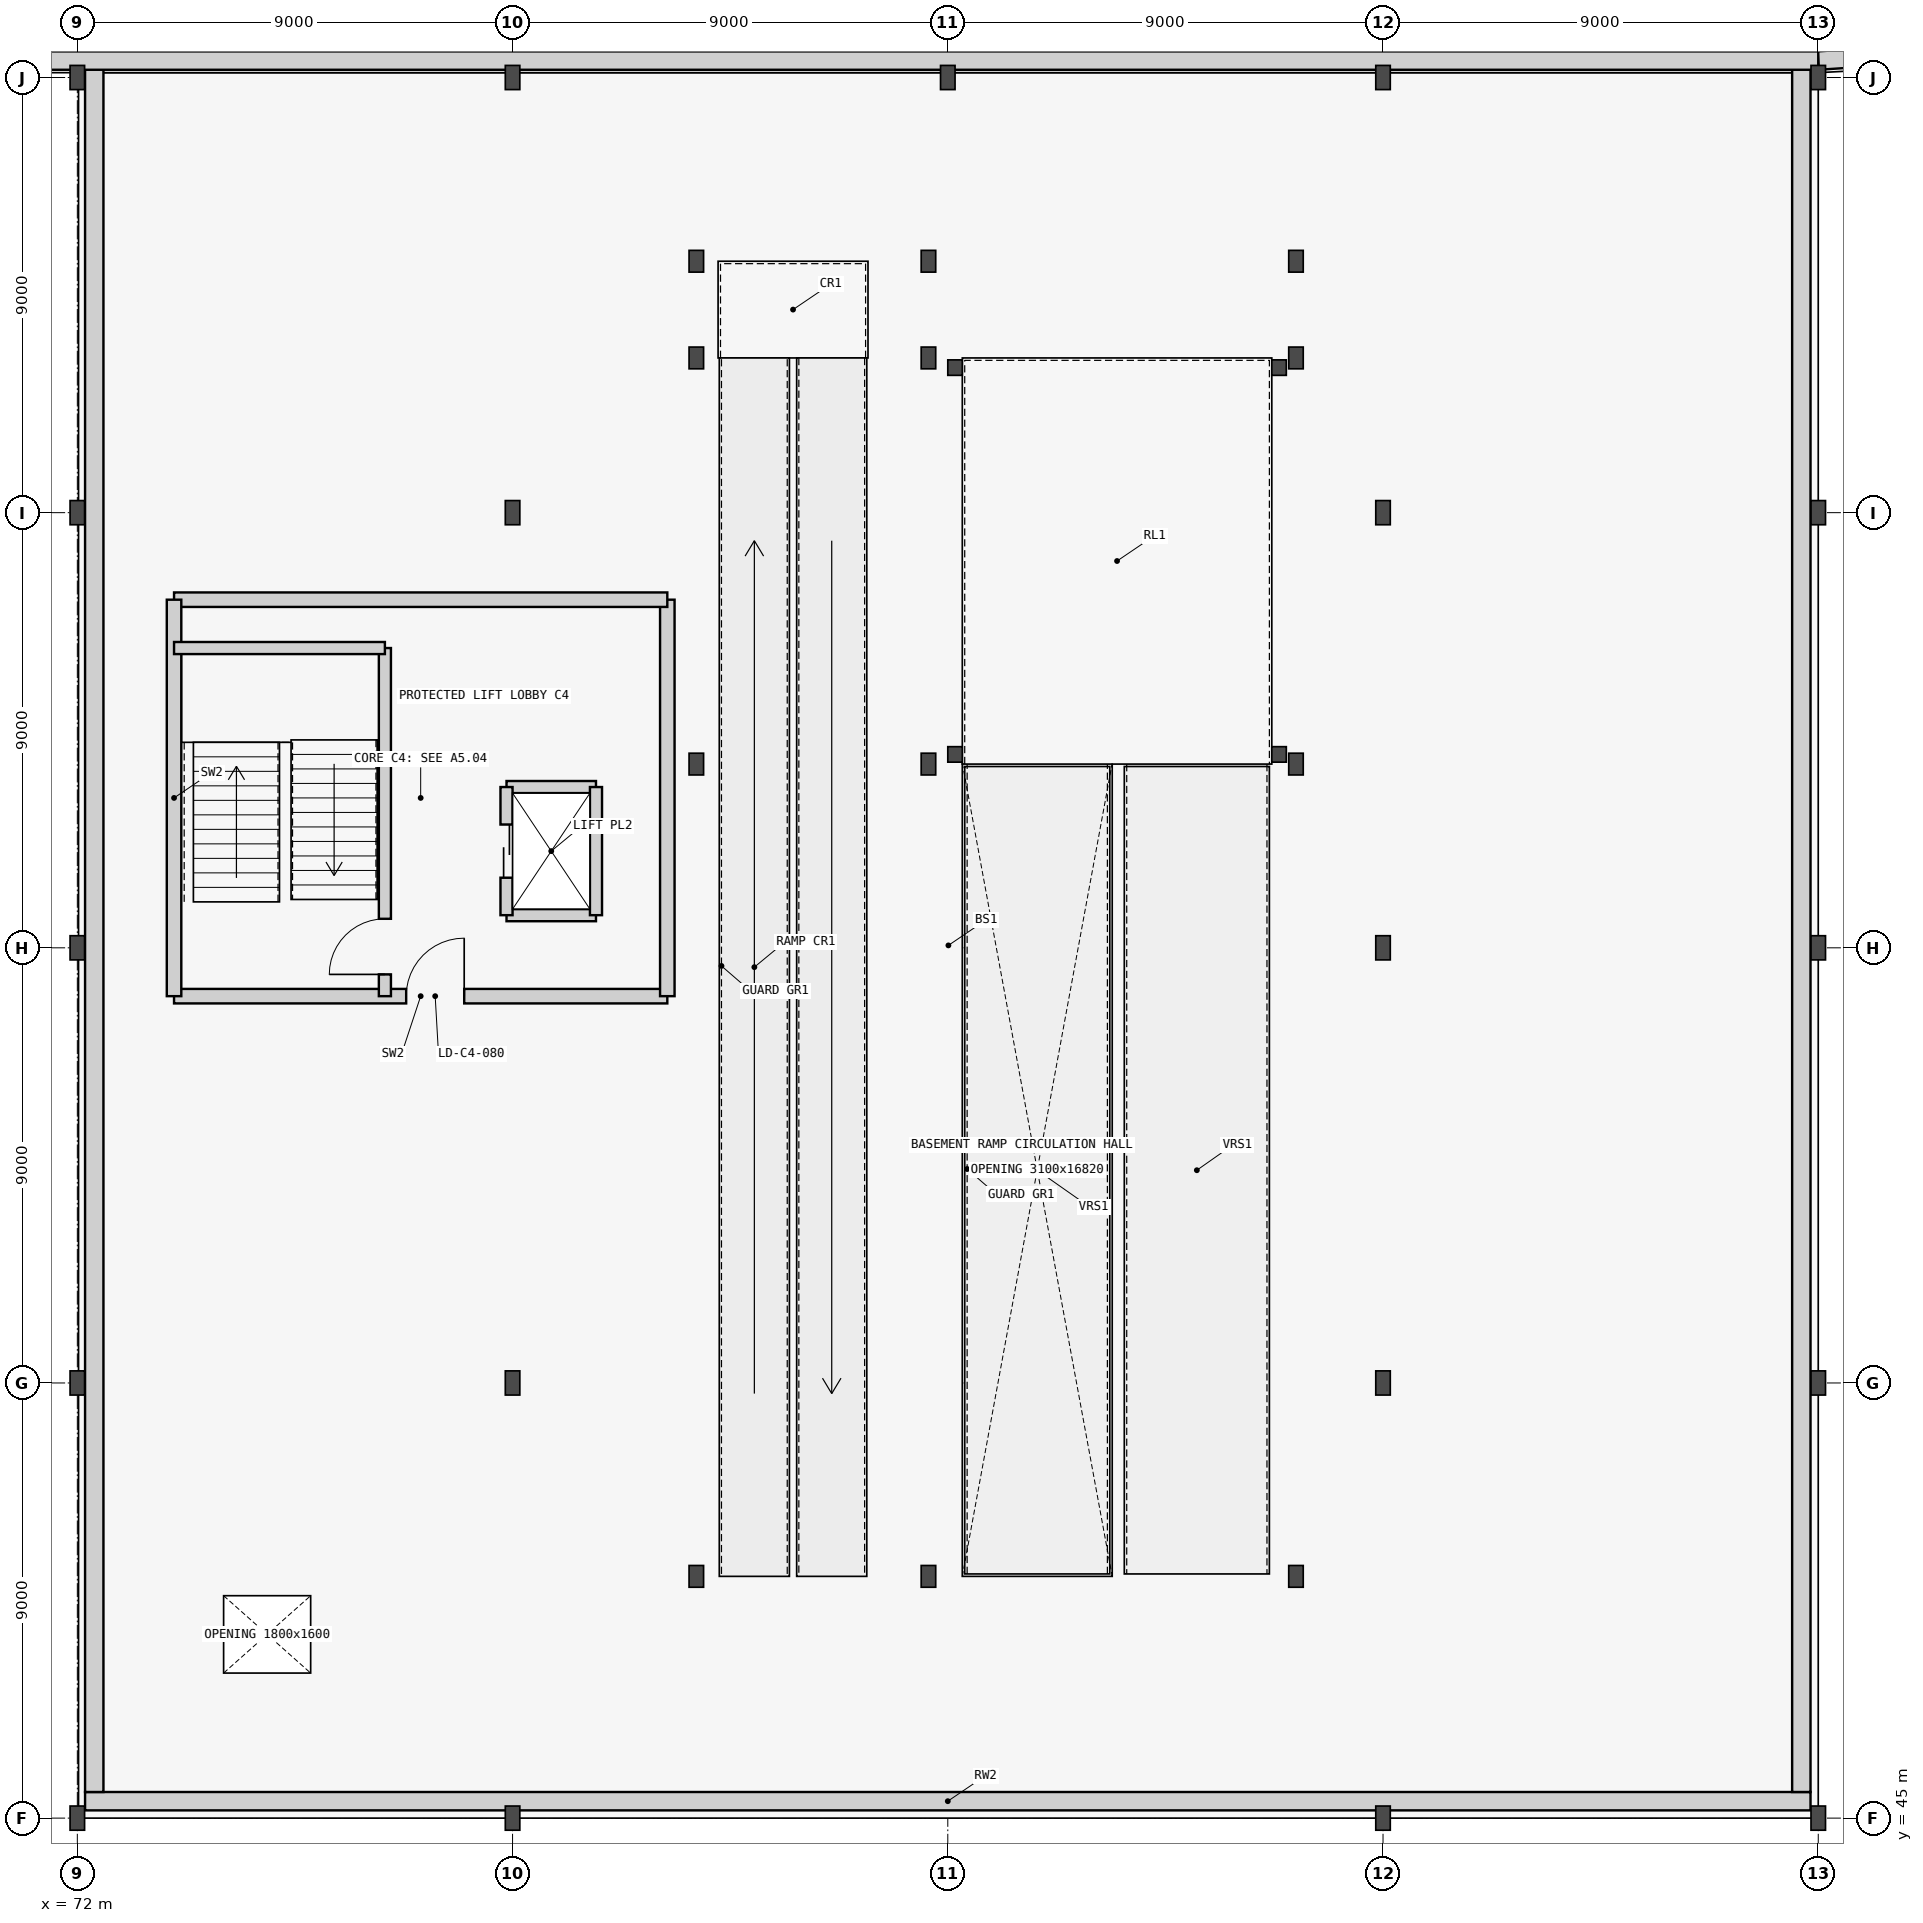
"""IFC4 building model, lengths in metres.
Left out: names, types, materials, properties, quantities, classifications, styles, units other than length and angle.
Written with IfcOpenShell. Run it as: python <this file> out.ifc"""

import sys

from ifc_helpers import new_model, si_unit, direction, frame, frame_2d, origin, origin_2d, place, context, subcontext, project, spatial, rectangle, i_section, extrude, element, fill, save


model = new_model("IFC4")
c1 = context("Model", 3, precision=1e-05, world=origin(), true_north=direction((0.0, 1.0)))
c2 = subcontext(c1, "Body", "Model", "MODEL_VIEW")
j1 = project(units=[si_unit("LENGTHUNIT", "METRE"), si_unit("PLANEANGLEUNIT", "RADIAN")], contexts=[c1])
p1 = place(None, origin())
s1 = spatial("IfcSite", under=j1, at=p1, CompositionType="ELEMENT")
p2 = place(p1, origin())
s2 = spatial("IfcBuilding", under=s1, at=p2, CompositionType="ELEMENT")
p3 = place(p2, frame((0.0, 0.0, -4.2)))
s3 = spatial("IfcBuildingStorey", under=s2, at=p3, CompositionType="ELEMENT", Elevation=-4.2)
for number, where, z_axis, x_axis in (
    (1, (72.0, 45.0, 0.0), (0.0, 0.0, 1.0), (1.0, 0.0, 0.0)),
    (2, (72.0, 54.0, 0.0), (0.0, 0.0, 1.0), (1.0, 0.0, 0.0)),
    (3, (72.0, 63.0, 0.0), (0.0, 0.0, 1.0), (1.0, 0.0, 0.0)),
    (4, (72.0, 72.0, 0.0), (0.0, 0.0, 1.0), (1.0, 0.0, 0.0)),
    (5, (72.0, 81.0, 0.0), (0.0, 0.0, 1.0), (1.0, 0.0, 0.0)),
    (6, (81.0, 45.0, 0.0), (0.0, 0.0, 1.0), (1.0, 0.0, 0.0)),
    (7, (81.0, 54.0, 0.0), (0.0, 0.0, 1.0), (1.0, 0.0, 0.0)),
    (8, (81.0, 72.0, 0.0), (0.0, 0.0, 1.0), (1.0, 0.0, 0.0)),
    (9, (81.0, 81.0, 0.0), (0.0, 0.0, 1.0), (1.0, 0.0, 0.0)),
    (10, (99.0, 45.0, 0.0), (0.0, 0.0, 1.0), (1.0, 0.0, 0.0)),
    (11, (99.0, 54.0, 0.0), (0.0, 0.0, 1.0), (1.0, 0.0, 0.0)),
    (12, (99.0, 63.0, 0.0), (0.0, 0.0, 1.0), (1.0, 0.0, 0.0)),
    (13, (99.0, 72.0, 0.0), (0.0, 0.0, 1.0), (1.0, 0.0, 0.0)),
    (14, (99.0, 81.0, 0.0), (0.0, 0.0, 1.0), (1.0, 0.0, 0.0)),
    (15, (108.0, 45.0, 0.0), (0.0, 0.0, 1.0), (1.0, 0.0, 0.0)),
    (16, (108.0, 54.0, 0.0), (0.0, 0.0, 1.0), (1.0, 0.0, 0.0)),
    (17, (108.0, 63.0, 0.0), (0.0, 0.0, 1.0), (1.0, 0.0, 0.0)),
    (18, (108.0, 72.0, 0.0), (0.0, 0.0, 1.0), (1.0, 0.0, 0.0)),
    (19, (108.0, 81.0, 0.0), (0.0, 0.0, 1.0), (1.0, 0.0, 0.0)),
):
    element("IfcColumn", number, at=place(p3, frame(where, z_axis=z_axis, x_axis=x_axis)), inside=s3, PredefinedType="COLUMN", context=c2, shape_type="SweptSolid", body=[
        extrude(i_section(OverallWidth=0.3, OverallDepth=0.5, WebThickness=0.014, FlangeThickness=0.028, FilletRadius=0.027, at=origin_2d()), origin(), (0.0, 0.0, 1.0), 4.2),
    ])
for number, where, z_axis, x_axis in (
    (20, (84.8, 50.0, 0.0), (0.0, 0.0, 1.0), (1.0, 0.0, 0.0)),
    (21, (84.8, 66.8, 0.0), (0.0, 0.0, 1.0), (1.0, 0.0, 0.0)),
    (22, (84.8, 75.2, 0.0), (0.0, 0.0, 1.0), (1.0, 0.0, 0.0)),
    (23, (84.8, 77.2, 0.0), (0.0, 0.0, 1.0), (1.0, 0.0, 0.0)),
    (24, (89.6, 50.0, 0.0), (0.0, 0.0, 1.0), (1.0, 0.0, 0.0)),
    (25, (89.6, 66.8, 0.0), (0.0, 0.0, 1.0), (1.0, 0.0, 0.0)),
    (26, (89.6, 75.2, 0.0), (0.0, 0.0, 1.0), (1.0, 0.0, 0.0)),
    (27, (89.6, 77.2, 0.0), (0.0, 0.0, 1.0), (1.0, 0.0, 0.0)),
    (28, (97.2, 50.0, 0.0), (0.0, 0.0, 1.0), (1.0, 0.0, 0.0)),
    (29, (97.2, 66.8, 0.0), (0.0, 0.0, 1.0), (1.0, 0.0, 0.0)),
    (30, (97.2, 75.2, 0.0), (0.0, 0.0, 1.0), (1.0, 0.0, 0.0)),
    (31, (97.2, 77.2, 0.0), (0.0, 0.0, 1.0), (1.0, 0.0, 0.0)),
):
    element("IfcColumn", number, at=place(p3, frame(where, z_axis=z_axis, x_axis=x_axis)), inside=s3, PredefinedType="COLUMN", context=c2, shape_type="SweptSolid", body=[
        extrude(i_section(OverallWidth=0.3, OverallDepth=0.45, WebThickness=0.014, FlangeThickness=0.026, FilletRadius=0.027, at=origin_2d()), origin(), (0.0, 0.0, 1.0), 4.2),
    ])
p4 = place(p3, frame((90.0, 81.0, 0.0), z_axis=(0.0, 0.0, 1.0), x_axis=(1.0, 0.0, 0.0)))
e32 = element("IfcColumn", 32, at=p4, inside=s3, PredefinedType="COLUMN", context=c2, shape_type="SweptSolid", body=[
    extrude(i_section(OverallWidth=0.3, OverallDepth=0.5, WebThickness=0.014, FlangeThickness=0.028, FilletRadius=0.027, at=origin_2d()), origin(), (0.0, 0.0, 1.0), 4.2),
])
for number, where, z_axis, x_axis in (
    (33, (90.15, 67.0, 0.0), (0.0, 0.0, 1.0), (1.0, 0.0, 0.0)),
    (34, (90.15, 75.0, 0.0), (0.0, 0.0, 1.0), (1.0, 0.0, 0.0)),
    (35, (96.85, 67.0, 0.0), (0.0, 0.0, 1.0), (1.0, 0.0, 0.0)),
    (36, (96.85, 75.0, 0.0), (0.0, 0.0, 1.0), (1.0, 0.0, 0.0)),
):
    element("IfcColumn", number, at=place(p3, frame(where, z_axis=z_axis, x_axis=x_axis)), inside=s3, PredefinedType="COLUMN", context=c2, shape_type="SweptSolid", body=[
        extrude(i_section(OverallWidth=0.3, OverallDepth=0.32, WebThickness=0.011, FlangeThickness=0.021, FilletRadius=0.027, at=origin_2d()), origin(), (0.0, 0.0, 1.0), 4.2),
    ])
p5 = place(p3, frame((72.16, 45.35, 0.0), z_axis=(0.0, 0.0, 1.0), x_axis=(1.0, 0.0, 0.0)))
e37 = element("IfcWall", 37, at=p5, inside=s3, PredefinedType="USERDEFINED", context=c2, shape_type="SweptSolid", body=[
    extrude(rectangle(XDim=35.68, YDim=0.38, at=frame_2d((17.84, 0.0))), origin(), (0.0, 0.0, 1.0), 3.6),
])
for number, where, z_axis, x_axis in (
    (38, (72.35, 45.54, 0.0), (0.0, 0.0, 1.0), (0.0, 1.0, 0.0)),
    (39, (107.65, 45.54, 0.0), (0.0, 0.0, 1.0), (0.0, 1.0, 0.0)),
):
    element("IfcWall", number, at=place(p3, frame(where, z_axis=z_axis, x_axis=x_axis)), inside=s3, PredefinedType="USERDEFINED", context=c2, shape_type="SweptSolid", body=[
        extrude(rectangle(XDim=35.81, YDim=0.38, at=frame_2d((17.905, 0.0))), origin(), (0.0, 0.0, 1.0), 3.6),
    ])
p6 = place(p3, frame((108.0, 81.35, 0.0), z_axis=(0.0, 0.0, 1.0), x_axis=(0.997859834312, 0.065389227447, 0.0)))
e40 = element("IfcWall", 40, at=p6, inside=s3, PredefinedType="USERDEFINED", context=c2, shape_type="SweptSolid", body=[
    extrude(rectangle(XDim=2.897, YDim=0.38, at=frame_2d((1.449, 0.0))), origin(), (0.0, 0.0, 1.0), 3.6),
])
p7 = place(p3, frame((63.0, 81.35, 0.0), z_axis=(0.0, 0.0, 1.0), x_axis=(1.0, 0.0, 0.0)))
e41 = element("IfcWall", 41, at=p7, inside=s3, PredefinedType="USERDEFINED", context=c2, shape_type="SweptSolid", body=[
    extrude(rectangle(XDim=45.0, YDim=0.38, at=frame_2d((22.5, 0.0))), origin(), (0.0, 0.0, 1.0), 3.6),
])
p8 = place(p3, frame((74.0, 62.0, 0.0), z_axis=(0.0, 0.0, 1.0), x_axis=(1.0, 0.0, 0.0)))
e42 = element("IfcWall", 42, at=p8, inside=s3, PredefinedType="SHEAR", context=c2, shape_type="SweptSolid", body=[
    extrude(rectangle(XDim=10.2, YDim=0.3, at=frame_2d((5.1, 0.0))), origin(), (0.0, 0.0, 1.0), 3.94),
])
p9 = place(p8, frame((4.8, 0.0, 0.0)))
e43 = element("IfcOpeningElement", 43, at=p9, cuts=e42, PredefinedType="OPENING", context=c2, shape_type="SweptSolid", body=[
    extrude(rectangle(XDim=1.2, YDim=2.15, at=frame_2d((0.6, 1.075))), frame((0.0, 0.16, 0.0), z_axis=(0.0, -1.0, 0.0), x_axis=(1.0, 0.0, 0.0)), (0.0, 0.0, 1.0), 0.32),
])
p10 = place(p3, frame((84.2, 62.0, 0.0), z_axis=(0.0, 0.0, 1.0), x_axis=(0.0, 1.0, 0.0)))
e44 = element("IfcWall", 44, at=p10, inside=s3, PredefinedType="SHEAR", context=c2, shape_type="SweptSolid", body=[
    extrude(rectangle(XDim=8.2, YDim=0.3, at=frame_2d((4.1, 0.0))), origin(), (0.0, 0.0, 1.0), 3.94),
])
p11 = place(p3, frame((84.2, 70.2, 0.0), z_axis=(0.0, 0.0, 1.0), x_axis=(-1.0, 0.0, 0.0)))
e45 = element("IfcWall", 45, at=p11, inside=s3, PredefinedType="SHEAR", context=c2, shape_type="SweptSolid", body=[
    extrude(rectangle(XDim=10.2, YDim=0.3, at=frame_2d((5.1, 0.0))), origin(), (0.0, 0.0, 1.0), 3.94),
])
p12 = place(p3, frame((74.0, 70.2, 0.0), z_axis=(0.0, 0.0, 1.0), x_axis=(0.0, -1.0, 0.0)))
e46 = element("IfcWall", 46, at=p12, inside=s3, PredefinedType="SHEAR", context=c2, shape_type="SweptSolid", body=[
    extrude(rectangle(XDim=8.2, YDim=0.3, at=frame_2d((4.1, 0.0))), origin(), (0.0, 0.0, 1.0), 3.94),
])
p13 = place(p3, frame((78.36, 62.0, 0.0), z_axis=(0.0, 0.0, 1.0), x_axis=(0.0, 1.0, 0.0)))
e47 = element("IfcWall", 47, at=p13, inside=s3, PredefinedType="SHEAR", context=c2, shape_type="SweptSolid", body=[
    extrude(rectangle(XDim=7.2, YDim=0.25, at=frame_2d((3.6, 0.0))), origin(), (0.0, 0.0, 1.0), 3.94),
])
p14 = place(p13, frame((0.45, 0.0, 0.0)))
e48 = element("IfcOpeningElement", 48, at=p14, cuts=e47, PredefinedType="OPENING", context=c2, shape_type="SweptSolid", body=[
    extrude(rectangle(XDim=1.15, YDim=2.15, at=frame_2d((0.575, 1.075))), frame((0.0, 0.135, 0.0), z_axis=(0.0, -1.0, 0.0), x_axis=(1.0, 0.0, 0.0)), (0.0, 0.0, 1.0), 0.27),
])
p15 = place(p3, frame((74.0, 69.2, 0.0), z_axis=(0.0, 0.0, 1.0), x_axis=(1.0, 0.0, 0.0)))
e49 = element("IfcWall", 49, at=p15, inside=s3, PredefinedType="SHEAR", context=c2, shape_type="SweptSolid", body=[
    extrude(rectangle(XDim=4.36, YDim=0.25, at=frame_2d((2.18, 0.0))), origin(), (0.0, 0.0, 1.0), 3.94),
])
for number, where, z_axis, x_axis in (
    (50, (80.875, 63.675, 0.0), (0.0, 0.0, 1.0), (1.0, 0.0, 0.0)),
    (51, (80.875, 66.325, 0.0), (0.0, 0.0, 1.0), (1.0, 0.0, 0.0)),
):
    element("IfcWall", number, at=place(p3, frame(where, z_axis=z_axis, x_axis=x_axis)), inside=s3, PredefinedType="SHEAR", context=c2, shape_type="SweptSolid", body=[
        extrude(rectangle(XDim=1.85, YDim=0.25, at=frame_2d((0.925, 0.0))), origin(), (0.0, 0.0, 1.0), 3.94),
    ])
p16 = place(p3, frame((82.725, 63.675, 0.0), z_axis=(0.0, 0.0, 1.0), x_axis=(0.0, 1.0, 0.0)))
e52 = element("IfcWall", 52, at=p16, inside=s3, PredefinedType="SHEAR", context=c2, shape_type="SweptSolid", body=[
    extrude(rectangle(XDim=2.65, YDim=0.25, at=frame_2d((1.325, 0.0))), origin(), (0.0, 0.0, 1.0), 3.94),
])
p17 = place(p3, frame((80.875, 63.675, 0.0), z_axis=(0.0, 0.0, 1.0), x_axis=(0.0, 1.0, 0.0)))
e53 = element("IfcWall", 53, at=p17, inside=s3, PredefinedType="SHEAR", context=c2, shape_type="SweptSolid", body=[
    extrude(rectangle(XDim=2.65, YDim=0.25, at=frame_2d((1.325, 0.0))), origin(), (0.0, 0.0, 1.0), 3.94),
])
p18 = place(p17, frame((0.775, 0.0, 0.0)))
e54 = element("IfcOpeningElement", 54, at=p18, cuts=e53, PredefinedType="OPENING", context=c2, shape_type="SweptSolid", body=[
    extrude(rectangle(XDim=1.1, YDim=2.15, at=frame_2d((0.55, 1.075))), frame((0.0, 0.135, 0.0), z_axis=(0.0, -1.0, 0.0), x_axis=(1.0, 0.0, 0.0)), (0.0, 0.0, 1.0), 0.27),
])
p19 = place(p14, origin())
e55 = element("IfcDoor", 55, at=p19, inside=s3, OperationType="SINGLE_SWING_LEFT", PredefinedType="DOOR", context=c2, shape_type="SweptSolid", body=[
    extrude(rectangle(XDim=1.15, YDim=2.15, at=frame_2d((0.575, 1.075))), frame((0.0, 0.025, 0.0), z_axis=(0.0, -1.0, 0.0), x_axis=(1.0, 0.0, 0.0)), (0.0, 0.0, 1.0), 0.05),
])
fill(e48, e55)
p20 = place(p9, origin())
e56 = element("IfcDoor", 56, at=p20, inside=s3, OperationType="SINGLE_SWING_RIGHT", PredefinedType="DOOR", context=c2, shape_type="SweptSolid", body=[
    extrude(rectangle(XDim=1.2, YDim=2.15, at=frame_2d((0.6, 1.075))), frame((0.0, 0.025, 0.0), z_axis=(0.0, -1.0, 0.0), x_axis=(1.0, 0.0, 0.0)), (0.0, 0.0, 1.0), 0.05),
])
fill(e43, e56)
p21 = place(p18, origin())
e57 = element("IfcDoor", 57, at=p21, inside=s3, OperationType="DOUBLE_DOOR_SLIDING", PredefinedType="USERDEFINED", context=c2, shape_type="SweptSolid", body=[
    extrude(rectangle(XDim=1.1, YDim=2.15, at=frame_2d((0.55, 1.075))), frame((0.0, 0.025, 0.0), z_axis=(0.0, -1.0, 0.0), x_axis=(1.0, 0.0, 0.0)), (0.0, 0.0, 1.0), 0.05),
])
fill(e54, e57)
save(model, sys.argv[1])
